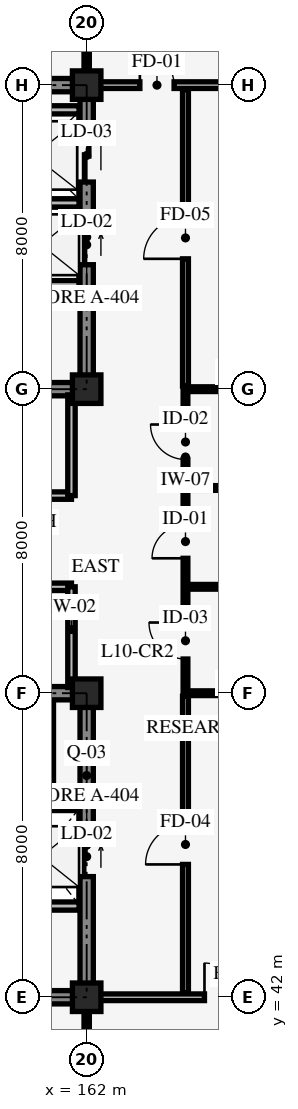
"""IFC4 building model, lengths in metres.
Left out: names, types, materials, properties, quantities, classifications, styles, units other than length and angle.
Written with IfcOpenShell. Run it as: python <this file> out.ifc"""

import sys

from ifc_helpers import new_model, si_unit, direction, frame, frame_2d, origin, origin_2d, place, context, subcontext, project, spatial, rectangle, extrude, element, fill, save


model = new_model("IFC4")
c1 = context("Model", 3, precision=1e-05, world=origin(), true_north=direction((0.0, 1.0)))
c2 = subcontext(c1, "Body", "Model", "MODEL_VIEW")
j1 = project(units=[si_unit("LENGTHUNIT", "METRE"), si_unit("PLANEANGLEUNIT", "RADIAN")], contexts=[c1])
p1 = place(None, origin())
s1 = spatial("IfcSite", under=j1, at=p1, CompositionType="ELEMENT")
p2 = place(p1, origin())
s2 = spatial("IfcBuilding", under=s1, at=p2, CompositionType="ELEMENT")
p3 = place(p2, frame((0.0, 0.0, 40.2)))
s3 = spatial("IfcBuildingStorey", under=s2, at=p3, CompositionType="ELEMENT", Elevation=40.2)
p4 = place(p3, frame((154.0, 42.0, 0.0), z_axis=(0.0, 0.0, 1.0), x_axis=(1.0, 0.0, 0.0)))
e1 = element("IfcWall", 1, at=p4, inside=s3, PredefinedType="SHEAR", context=c2, shape_type="SweptSolid", body=[
    extrude(rectangle(XDim=8.0, YDim=0.35, at=frame_2d((4.0, 0.0))), origin(), (0.0, 0.0, 1.0), 3.95),
])
p5 = place(p3, frame((162.0, 42.0, 0.0), z_axis=(0.0, 0.0, 1.0), x_axis=(0.0, 1.0, 0.0)))
e2 = element("IfcWall", 2, at=p5, inside=s3, PredefinedType="SHEAR", context=c2, shape_type="SweptSolid", body=[
    extrude(rectangle(XDim=8.0, YDim=0.35, at=frame_2d((4.0, 0.0))), origin(), (0.0, 0.0, 1.0), 3.95),
])
p6 = place(p5, frame((3.175, 0.0, 0.0)))
e3 = element("IfcOpeningElement", 3, at=p6, cuts=e2, PredefinedType="OPENING", context=c2, shape_type="SweptSolid", body=[
    extrude(rectangle(XDim=1.05, YDim=2.2, at=frame_2d((0.525, 1.1))), frame((0.0, 0.185, 0.0), z_axis=(0.0, -1.0, 0.0), x_axis=(1.0, 0.0, 0.0)), (0.0, 0.0, 1.0), 0.37),
])
p7 = place(p3, frame((162.0, 50.0, 0.0), z_axis=(0.0, 0.0, 1.0), x_axis=(-1.0, 0.0, 0.0)))
e4 = element("IfcWall", 4, at=p7, inside=s3, PredefinedType="SHEAR", context=c2, shape_type="SweptSolid", body=[
    extrude(rectangle(XDim=8.0, YDim=0.35, at=frame_2d((4.0, 0.0))), origin(), (0.0, 0.0, 1.0), 3.95),
])
p8 = place(p7, frame((5.3, 0.0, 0.0)))
e5 = element("IfcOpeningElement", 5, at=p8, cuts=e4, PredefinedType="OPENING", context=c2, shape_type="SweptSolid", body=[
    extrude(rectangle(XDim=1.3, YDim=2.15, at=frame_2d((0.65, 1.075))), frame((0.0, 0.185, 0.0), z_axis=(0.0, -1.0, 0.0), x_axis=(1.0, 0.0, 0.0)), (0.0, 0.0, 1.0), 0.37),
])
p9 = place(p7, frame((1.45, 0.0, 0.0)))
e6 = element("IfcOpeningElement", 6, at=p9, cuts=e4, PredefinedType="OPENING", context=c2, shape_type="SweptSolid", body=[
    extrude(rectangle(XDim=1.1, YDim=2.2, at=frame_2d((0.55, 1.1))), frame((0.0, 0.185, 0.0), z_axis=(0.0, -1.0, 0.0), x_axis=(1.0, 0.0, 0.0)), (0.0, 0.0, 1.0), 0.37),
])
p10 = place(p3, frame((154.0, 58.0, 0.0), z_axis=(0.0, 0.0, 1.0), x_axis=(1.0, 0.0, 0.0)))
e7 = element("IfcWall", 7, at=p10, inside=s3, PredefinedType="SHEAR", context=c2, shape_type="SweptSolid", body=[
    extrude(rectangle(XDim=8.0, YDim=0.35, at=frame_2d((4.0, 0.0))), origin(), (0.0, 0.0, 1.0), 3.95),
])
p11 = place(p10, frame((1.4, 0.0, 0.0)))
e8 = element("IfcOpeningElement", 8, at=p11, cuts=e7, PredefinedType="OPENING", context=c2, shape_type="SweptSolid", body=[
    extrude(rectangle(XDim=1.3, YDim=2.15, at=frame_2d((0.65, 1.075))), frame((0.0, 0.185, 0.0), z_axis=(0.0, -1.0, 0.0), x_axis=(1.0, 0.0, 0.0)), (0.0, 0.0, 1.0), 0.37),
])
p12 = place(p10, frame((5.3, 0.0, 0.0)))
e9 = element("IfcOpeningElement", 9, at=p12, cuts=e7, PredefinedType="OPENING", context=c2, shape_type="SweptSolid", body=[
    extrude(rectangle(XDim=1.1, YDim=2.2, at=frame_2d((0.55, 1.1))), frame((0.0, 0.185, 0.0), z_axis=(0.0, -1.0, 0.0), x_axis=(1.0, 0.0, 0.0)), (0.0, 0.0, 1.0), 0.37),
])
p13 = place(p3, frame((162.0, 58.0, 0.0), z_axis=(0.0, 0.0, 1.0), x_axis=(0.0, 1.0, 0.0)))
e10 = element("IfcWall", 10, at=p13, inside=s3, PredefinedType="SHEAR", context=c2, shape_type="SweptSolid", body=[
    extrude(rectangle(XDim=8.0, YDim=0.35, at=frame_2d((4.0, 0.0))), origin(), (0.0, 0.0, 1.0), 3.95),
])
p14 = place(p13, frame((3.275, 0.0, 0.0)))
e11 = element("IfcOpeningElement", 11, at=p14, cuts=e10, PredefinedType="OPENING", context=c2, shape_type="SweptSolid", body=[
    extrude(rectangle(XDim=1.05, YDim=2.2, at=frame_2d((0.525, 1.1))), frame((0.0, 0.185, 0.0), z_axis=(0.0, -1.0, 0.0), x_axis=(1.0, 0.0, 0.0)), (0.0, 0.0, 1.0), 0.37),
])
p15 = place(p13, frame((5.45, 0.0, 0.0)))
e12 = element("IfcOpeningElement", 12, at=p15, cuts=e10, PredefinedType="OPENING", context=c2, shape_type="SweptSolid", body=[
    extrude(rectangle(XDim=1.4, YDim=2.3, at=frame_2d((0.7, 1.15))), frame((0.0, 0.185, 0.0), z_axis=(0.0, -1.0, 0.0), x_axis=(1.0, 0.0, 0.0)), (0.0, 0.0, 1.0), 0.37),
])
p16 = place(p3, frame((162.0, 66.0, 0.0), z_axis=(0.0, 0.0, 1.0), x_axis=(-1.0, 0.0, 0.0)))
e13 = element("IfcWall", 13, at=p16, inside=s3, PredefinedType="SHEAR", context=c2, shape_type="SweptSolid", body=[
    extrude(rectangle(XDim=8.0, YDim=0.35, at=frame_2d((4.0, 0.0))), origin(), (0.0, 0.0, 1.0), 3.95),
])
for number, where, z_axis, x_axis in (
    (14, (162.0, 42.0, 0.0), (0.0, 0.0, 1.0), (1.0, 0.0, 0.0)),
    (15, (162.0, 50.0, 0.0), (0.0, 0.0, 1.0), (1.0, 0.0, 0.0)),
    (16, (162.0, 58.0, 0.0), (0.0, 0.0, 1.0), (1.0, 0.0, 0.0)),
    (17, (162.0, 66.0, 0.0), (0.0, 0.0, 1.0), (1.0, 0.0, 0.0)),
):
    element("IfcColumn", number, at=place(p3, frame(where, z_axis=z_axis, x_axis=x_axis)), inside=s3, PredefinedType="COLUMN", context=c2, shape_type="SweptSolid", body=[
        extrude(rectangle(XDim=0.75, YDim=0.75, at=origin_2d()), origin(), (0.0, 0.0, 1.0), 4.2),
    ])
p17 = place(p3, frame((158.45, 47.02, 0.0), z_axis=(0.0, 0.0, 1.0), x_axis=(1.0, 0.0, 0.0)))
e18 = element("IfcWall", 18, at=p17, inside=s3, PredefinedType="STANDARD", context=c2, shape_type="SweptSolid", body=[
    extrude(rectangle(XDim=3.35, YDim=0.215, at=frame_2d((1.675, 0.0))), origin(), (0.0, 0.0, 1.0), 3.9),
])
p18 = place(p3, frame((161.02, 47.02, 0.0), z_axis=(0.0, 0.0, 1.0), x_axis=(0.0, 1.0, 0.0)))
e19 = element("IfcWall", 19, at=p18, inside=s3, PredefinedType="STANDARD", context=c2, shape_type="SweptSolid", body=[
    extrude(rectangle(XDim=2.78, YDim=0.215, at=frame_2d((1.39, 0.0))), origin(), (0.0, 0.0, 1.0), 3.9),
])
p19 = place(p3, frame((159.78, 44.4, 0.0), z_axis=(0.0, 0.0, 1.0), x_axis=(1.0, 0.0, 0.0)))
e20 = element("IfcWall", 20, at=p19, inside=s3, PredefinedType="STANDARD", context=c2, shape_type="SweptSolid", body=[
    extrude(rectangle(XDim=2.02, YDim=0.215, at=frame_2d((1.01, 0.0))), origin(), (0.0, 0.0, 1.0), 3.9),
])
p20 = place(p3, frame((158.45, 62.9, 0.0), z_axis=(0.0, 0.0, 1.0), x_axis=(1.0, 0.0, 0.0)))
e21 = element("IfcWall", 21, at=p20, inside=s3, PredefinedType="STANDARD", context=c2, shape_type="SweptSolid", body=[
    extrude(rectangle(XDim=3.35, YDim=0.215, at=frame_2d((1.675, 0.0))), origin(), (0.0, 0.0, 1.0), 3.9),
])
p21 = place(p3, frame((159.38, 65.35, 0.0), z_axis=(0.0, 0.0, 1.0), x_axis=(1.0, 0.0, 0.0)))
e22 = element("IfcWall", 22, at=p21, inside=s3, PredefinedType="STANDARD", context=c2, shape_type="SweptSolid", body=[
    extrude(rectangle(XDim=2.42, YDim=0.215, at=frame_2d((1.21, 0.0))), origin(), (0.0, 0.0, 1.0), 3.9),
])
p22 = place(p3, frame((158.45, 60.75, 0.0), z_axis=(0.0, 0.0, 1.0), x_axis=(1.0, 0.0, 0.0)))
e23 = element("IfcWall", 23, at=p22, inside=s3, PredefinedType="STANDARD", context=c2, shape_type="SweptSolid", body=[
    extrude(rectangle(XDim=3.35, YDim=0.215, at=frame_2d((1.675, 0.0))), origin(), (0.0, 0.0, 1.0), 3.9),
])
p23 = place(p3, frame((154.0, 52.8, 0.0), z_axis=(0.0, 0.0, 1.0), x_axis=(1.0, 0.0, 0.0)))
e24 = element("IfcWall", 24, at=p23, inside=s3, PredefinedType="STANDARD", context=c2, shape_type="SweptSolid", body=[
    extrude(rectangle(XDim=7.6, YDim=0.195, at=frame_2d((3.8, 0.0))), origin(), (0.0, 0.0, 1.0), 3.9),
])
p24 = place(p23, frame((2.8, 0.0, 0.0)))
e25 = element("IfcOpeningElement", 25, at=p24, cuts=e24, PredefinedType="OPENING", context=c2, shape_type="SweptSolid", body=[
    extrude(rectangle(XDim=1.4, YDim=2.2, at=frame_2d((0.7, 1.1))), frame((0.0, 0.107, 0.0), z_axis=(0.0, -1.0, 0.0), x_axis=(1.0, 0.0, 0.0)), (0.0, 0.0, 1.0), 0.215),
])
p25 = place(p3, frame((161.6, 50.15, 0.0), z_axis=(0.0, 0.0, 1.0), x_axis=(0.0, 1.0, 0.0)))
e26 = element("IfcWall", 26, at=p25, inside=s3, PredefinedType="STANDARD", context=c2, shape_type="SweptSolid", body=[
    extrude(rectangle(XDim=2.65, YDim=0.195, at=frame_2d((1.325, 0.0))), origin(), (0.0, 0.0, 1.0), 3.14),
])
p26 = place(p3, frame((154.0, 55.2, 0.0), z_axis=(0.0, 0.0, 1.0), x_axis=(1.0, 0.0, 0.0)))
e27 = element("IfcWall", 27, at=p26, inside=s3, PredefinedType="STANDARD", context=c2, shape_type="SweptSolid", body=[
    extrude(rectangle(XDim=7.6, YDim=0.195, at=frame_2d((3.8, 0.0))), origin(), (0.0, 0.0, 1.0), 3.9),
])
p27 = place(p26, frame((2.8, 0.0, 0.0)))
e28 = element("IfcOpeningElement", 28, at=p27, cuts=e27, PredefinedType="OPENING", context=c2, shape_type="SweptSolid", body=[
    extrude(rectangle(XDim=1.2, YDim=2.1, at=frame_2d((0.6, 1.05))), frame((0.0, 0.107, 0.0), z_axis=(0.0, -1.0, 0.0), x_axis=(1.0, 0.0, 0.0)), (0.0, 0.0, 1.0), 0.215),
])
p28 = place(p3, frame((161.6, 55.2, 0.0), z_axis=(0.0, 0.0, 1.0), x_axis=(0.0, 1.0, 0.0)))
e29 = element("IfcWall", 29, at=p28, inside=s3, PredefinedType="STANDARD", context=c2, shape_type="SweptSolid", body=[
    extrude(rectangle(XDim=2.65, YDim=0.195, at=frame_2d((1.325, 0.0))), origin(), (0.0, 0.0, 1.0), 3.14),
])
p29 = place(p3, frame((164.6, 50.0, 0.0), z_axis=(0.0, 0.0, 1.0), x_axis=(0.0, 1.0, 0.0)))
e30 = element("IfcWall", 30, at=p29, inside=s3, PredefinedType="STANDARD", context=c2, shape_type="SweptSolid", body=[
    extrude(rectangle(XDim=8.0, YDim=0.125, at=frame_2d((4.0, 0.0))), origin(), (0.0, 0.0, 1.0), 3.9),
])
p30 = place(p29, frame((0.9, 0.0, 0.0)))
e31 = element("IfcOpeningElement", 31, at=p30, cuts=e30, PredefinedType="OPENING", context=c2, shape_type="SweptSolid", body=[
    extrude(rectangle(XDim=0.96, YDim=2.08, at=frame_2d((0.48, 1.04))), frame((0.0, 0.073, 0.0), z_axis=(0.0, -1.0, 0.0), x_axis=(1.0, 0.0, 0.0)), (0.0, 0.0, 1.0), 0.145),
])
p31 = place(p29, frame((3.55, 0.0, 0.0)))
e32 = element("IfcOpeningElement", 32, at=p31, cuts=e30, PredefinedType="OPENING", context=c2, shape_type="SweptSolid", body=[
    extrude(rectangle(XDim=0.88, YDim=2.05, at=frame_2d((0.44, 1.025))), frame((0.0, 0.073, 0.0), z_axis=(0.0, -1.0, 0.0), x_axis=(1.0, 0.0, 0.0)), (0.0, 0.0, 1.0), 0.145),
])
p32 = place(p29, frame((6.15, 0.0, 0.0)))
e33 = element("IfcOpeningElement", 33, at=p32, cuts=e30, PredefinedType="OPENING", context=c2, shape_type="SweptSolid", body=[
    extrude(rectangle(XDim=0.92, YDim=2.05, at=frame_2d((0.46, 1.025))), frame((0.0, 0.073, 0.0), z_axis=(0.0, -1.0, 0.0), x_axis=(1.0, 0.0, 0.0)), (0.0, 0.0, 1.0), 0.145),
])
p33 = place(p3, frame((164.6, 50.0, 0.0), z_axis=(0.0, 0.0, 1.0), x_axis=(1.0, 0.0, 0.0)))
e34 = element("IfcWall", 34, at=p33, inside=s3, PredefinedType="STANDARD", context=c2, shape_type="SweptSolid", body=[
    extrude(rectangle(XDim=3.8, YDim=0.125, at=frame_2d((1.9, 0.0))), origin(), (0.0, 0.0, 1.0), 3.09),
])
for number, where, z_axis, x_axis in (
    (35, (164.6, 52.8, 0.0), (0.0, 0.0, 1.0), (1.0, 0.0, 0.0)),
    (36, (164.6, 55.4, 0.0), (0.0, 0.0, 1.0), (1.0, 0.0, 0.0)),
):
    element("IfcWall", number, at=place(p3, frame(where, z_axis=z_axis, x_axis=x_axis)), inside=s3, PredefinedType="STANDARD", context=c2, shape_type="SweptSolid", body=[
        extrude(rectangle(XDim=3.8, YDim=0.125, at=frame_2d((1.9, 0.0))), origin(), (0.0, 0.0, 1.0), 3.9),
    ])
p34 = place(p3, frame((164.6, 58.0, 0.0), z_axis=(0.0, 0.0, 1.0), x_axis=(1.0, 0.0, 0.0)))
e37 = element("IfcWall", 37, at=p34, inside=s3, PredefinedType="STANDARD", context=c2, shape_type="SweptSolid", body=[
    extrude(rectangle(XDim=3.8, YDim=0.125, at=frame_2d((1.9, 0.0))), origin(), (0.0, 0.0, 1.0), 3.09),
])
p35 = place(p3, frame((164.6, 42.12, 0.0), z_axis=(0.0, 0.0, 1.0), x_axis=(0.0, 1.0, 0.0)))
e38 = element("IfcWall", 38, at=p35, inside=s3, PredefinedType="STANDARD", context=c2, shape_type="SweptSolid", body=[
    extrude(rectangle(XDim=7.8, YDim=0.155, at=frame_2d((3.9, 0.0))), origin(), (0.0, 0.0, 1.0), 3.9),
])
p36 = place(p35, frame((3.375, 0.0, 0.0)))
e39 = element("IfcOpeningElement", 39, at=p36, cuts=e38, PredefinedType="OPENING", context=c2, shape_type="SweptSolid", body=[
    extrude(rectangle(XDim=1.05, YDim=2.1, at=frame_2d((0.525, 1.05))), frame((0.0, 0.087, 0.0), z_axis=(0.0, -1.0, 0.0), x_axis=(1.0, 0.0, 0.0)), (0.0, 0.0, 1.0), 0.175),
])
p37 = place(p3, frame((164.6, 58.08, 0.0), z_axis=(0.0, 0.0, 1.0), x_axis=(0.0, 1.0, 0.0)))
e40 = element("IfcWall", 40, at=p37, inside=s3, PredefinedType="STANDARD", context=c2, shape_type="SweptSolid", body=[
    extrude(rectangle(XDim=7.8, YDim=0.155, at=frame_2d((3.9, 0.0))), origin(), (0.0, 0.0, 1.0), 3.9),
])
p38 = place(p37, frame((3.35, 0.0, 0.0)))
e41 = element("IfcOpeningElement", 41, at=p38, cuts=e40, PredefinedType="OPENING", context=c2, shape_type="SweptSolid", body=[
    extrude(rectangle(XDim=1.1, YDim=2.1, at=frame_2d((0.55, 1.05))), frame((0.0, 0.087, 0.0), z_axis=(0.0, -1.0, 0.0), x_axis=(1.0, 0.0, 0.0)), (0.0, 0.0, 1.0), 0.175),
])
p39 = place(p3, frame((162.0, 34.05, 0.0), z_axis=(0.0, 0.0, 1.0), x_axis=(0.0, 1.0, 0.0)))
e42 = element("IfcWall", 42, at=p39, inside=s3, PredefinedType="STANDARD", context=c2, shape_type="SweptSolid", body=[
    extrude(rectangle(XDim=7.83, YDim=0.14, at=frame_2d((3.915, 0.0))), origin(), (0.0, 0.0, 1.0), 3.14),
])
p40 = place(p39, frame((3.0, 0.0, 0.0)))
e43 = element("IfcOpeningElement", 43, at=p40, cuts=e42, PredefinedType="OPENING", context=c2, shape_type="SweptSolid", body=[
    extrude(rectangle(XDim=1.06, YDim=2.12, at=frame_2d((0.53, 1.06))), frame((0.0, 0.08, 0.0), z_axis=(0.0, -1.0, 0.0), x_axis=(1.0, 0.0, 0.0)), (0.0, 0.0, 1.0), 0.16),
])
p41 = place(p3, frame((162.35, 42.0, 0.0), z_axis=(0.0, 0.0, 1.0), x_axis=(1.0, 0.0, 0.0)))
e44 = element("IfcWall", 44, at=p41, inside=s3, PredefinedType="STANDARD", context=c2, shape_type="SweptSolid", body=[
    extrude(rectangle(XDim=14.7, YDim=0.175, at=frame_2d((7.35, 0.0))), origin(), (0.0, 0.0, 1.0), 3.09),
])
p42 = place(p41, frame((2.75, 0.0, 0.0)))
e45 = element("IfcOpeningElement", 45, at=p42, cuts=e44, PredefinedType="OPENING", context=c2, shape_type="SweptSolid", body=[
    extrude(rectangle(XDim=1.8, YDim=2.3, at=frame_2d((0.9, 1.15))), frame((0.0, 0.098, 0.0), z_axis=(0.0, -1.0, 0.0), x_axis=(1.0, 0.0, 0.0)), (0.0, 0.0, 1.0), 0.195),
])
p43 = place(p3, frame((162.0, 66.12, 0.0), z_axis=(0.0, 0.0, 1.0), x_axis=(0.0, 1.0, 0.0)))
e46 = element("IfcWall", 46, at=p43, inside=s3, PredefinedType="STANDARD", context=c2, shape_type="SweptSolid", body=[
    extrude(rectangle(XDim=7.83, YDim=0.14, at=frame_2d((3.915, 0.0))), origin(), (0.0, 0.0, 1.0), 3.14),
])
p44 = place(p43, frame((3.0, 0.0, 0.0)))
e47 = element("IfcOpeningElement", 47, at=p44, cuts=e46, PredefinedType="OPENING", context=c2, shape_type="SweptSolid", body=[
    extrude(rectangle(XDim=1.12, YDim=2.12, at=frame_2d((0.56, 1.06))), frame((0.0, 0.08, 0.0), z_axis=(0.0, -1.0, 0.0), x_axis=(1.0, 0.0, 0.0)), (0.0, 0.0, 1.0), 0.16),
])
p45 = place(p3, frame((162.35, 66.0, 0.0), z_axis=(0.0, 0.0, 1.0), x_axis=(1.0, 0.0, 0.0)))
e48 = element("IfcWall", 48, at=p45, inside=s3, PredefinedType="STANDARD", context=c2, shape_type="SweptSolid", body=[
    extrude(rectangle(XDim=14.7, YDim=0.175, at=frame_2d((7.35, 0.0))), origin(), (0.0, 0.0, 1.0), 3.09),
])
p46 = place(p45, frame((1.05, 0.0, 0.0)))
e49 = element("IfcOpeningElement", 49, at=p46, cuts=e48, PredefinedType="OPENING", context=c2, shape_type="SweptSolid", body=[
    extrude(rectangle(XDim=0.9, YDim=2.1, at=frame_2d((0.45, 1.05))), frame((0.0, 0.098, 0.0), z_axis=(0.0, -1.0, 0.0), x_axis=(1.0, 0.0, 0.0)), (0.0, 0.0, 1.0), 0.195),
])
p47 = place(p6, origin())
e50 = element("IfcDoor", 50, at=p47, inside=s3, OperationType="SLIDING_TO_LEFT", PredefinedType="DOOR", context=c2, shape_type="SweptSolid", body=[
    extrude(rectangle(XDim=1.05, YDim=2.2, at=frame_2d((0.525, 1.1))), frame((0.0, 0.025, 0.0), z_axis=(0.0, -1.0, 0.0), x_axis=(1.0, 0.0, 0.0)), (0.0, 0.0, 1.0), 0.05),
])
fill(e3, e50)
p48 = place(p14, origin())
e51 = element("IfcDoor", 51, at=p48, inside=s3, OperationType="SLIDING_TO_RIGHT", PredefinedType="DOOR", context=c2, shape_type="SweptSolid", body=[
    extrude(rectangle(XDim=1.05, YDim=2.2, at=frame_2d((0.525, 1.1))), frame((0.0, 0.025, 0.0), z_axis=(0.0, -1.0, 0.0), x_axis=(1.0, 0.0, 0.0)), (0.0, 0.0, 1.0), 0.05),
])
fill(e11, e51)
p49 = place(p15, origin())
e52 = element("IfcDoor", 52, at=p49, inside=s3, OperationType="DOUBLE_DOOR_SLIDING", PredefinedType="DOOR", context=c2, shape_type="SweptSolid", body=[
    extrude(rectangle(XDim=1.4, YDim=2.3, at=frame_2d((0.7, 1.15))), frame((0.0, 0.025, 0.0), z_axis=(0.0, -1.0, 0.0), x_axis=(1.0, 0.0, 0.0)), (0.0, 0.0, 1.0), 0.05),
])
fill(e12, e52)
p50 = place(p30, origin())
e53 = element("IfcDoor", 53, at=p50, inside=s3, OperationType="SINGLE_SWING_RIGHT", PredefinedType="DOOR", context=c2, shape_type="SweptSolid", body=[
    extrude(rectangle(XDim=0.96, YDim=2.08, at=frame_2d((0.48, 1.04))), frame((0.0, 0.025, 0.0), z_axis=(0.0, -1.0, 0.0), x_axis=(1.0, 0.0, 0.0)), (0.0, 0.0, 1.0), 0.05),
])
fill(e31, e53)
p51 = place(p31, origin())
e54 = element("IfcDoor", 54, at=p51, inside=s3, OperationType="SINGLE_SWING_LEFT", PredefinedType="DOOR", context=c2, shape_type="SweptSolid", body=[
    extrude(rectangle(XDim=0.88, YDim=2.05, at=frame_2d((0.44, 1.025))), frame((0.0, 0.025, 0.0), z_axis=(0.0, -1.0, 0.0), x_axis=(1.0, 0.0, 0.0)), (0.0, 0.0, 1.0), 0.05),
])
fill(e32, e54)
p52 = place(p32, origin())
e55 = element("IfcDoor", 55, at=p52, inside=s3, OperationType="SINGLE_SWING_RIGHT", PredefinedType="DOOR", context=c2, shape_type="SweptSolid", body=[
    extrude(rectangle(XDim=0.92, YDim=2.05, at=frame_2d((0.46, 1.025))), frame((0.0, 0.025, 0.0), z_axis=(0.0, -1.0, 0.0), x_axis=(1.0, 0.0, 0.0)), (0.0, 0.0, 1.0), 0.05),
])
fill(e33, e55)
p53 = place(p36, origin())
e56 = element("IfcDoor", 56, at=p53, inside=s3, OperationType="SINGLE_SWING_LEFT", PredefinedType="DOOR", context=c2, shape_type="SweptSolid", body=[
    extrude(rectangle(XDim=1.05, YDim=2.1, at=frame_2d((0.525, 1.05))), frame((0.0, 0.025, 0.0), z_axis=(0.0, -1.0, 0.0), x_axis=(1.0, 0.0, 0.0)), (0.0, 0.0, 1.0), 0.05),
])
fill(e39, e56)
p54 = place(p38, origin())
e57 = element("IfcDoor", 57, at=p54, inside=s3, OperationType="SINGLE_SWING_LEFT", PredefinedType="DOOR", context=c2, shape_type="SweptSolid", body=[
    extrude(rectangle(XDim=1.1, YDim=2.1, at=frame_2d((0.55, 1.05))), frame((0.0, 0.025, 0.0), z_axis=(0.0, -1.0, 0.0), x_axis=(1.0, 0.0, 0.0)), (0.0, 0.0, 1.0), 0.05),
])
fill(e41, e57)
p55 = place(p42, origin())
e58 = element("IfcDoor", 58, at=p55, inside=s3, OperationType="DOUBLE_DOOR_SINGLE_SWING", PredefinedType="DOOR", context=c2, shape_type="SweptSolid", body=[
    extrude(rectangle(XDim=1.8, YDim=2.3, at=frame_2d((0.9, 1.15))), frame((0.0, 0.025, 0.0), z_axis=(0.0, -1.0, 0.0), x_axis=(1.0, 0.0, 0.0)), (0.0, 0.0, 1.0), 0.05),
])
fill(e45, e58)
p56 = place(p46, origin())
e59 = element("IfcDoor", 59, at=p56, inside=s3, OperationType="SINGLE_SWING_LEFT", PredefinedType="DOOR", context=c2, shape_type="SweptSolid", body=[
    extrude(rectangle(XDim=0.9, YDim=2.1, at=frame_2d((0.45, 1.05))), frame((0.0, 0.025, 0.0), z_axis=(0.0, -1.0, 0.0), x_axis=(1.0, 0.0, 0.0)), (0.0, 0.0, 1.0), 0.05),
])
fill(e49, e59)
save(model, sys.argv[1])
